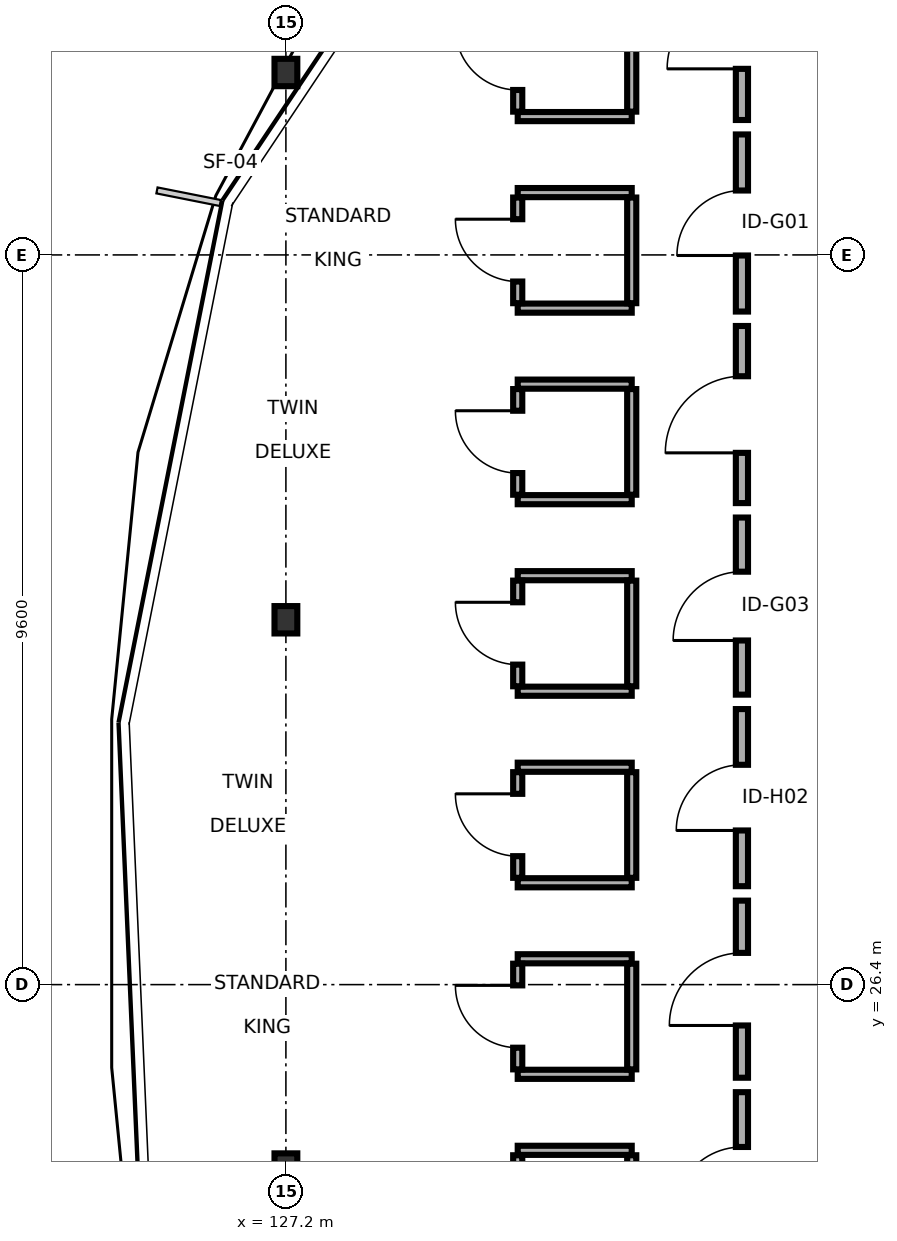
"""IFC4 building model, lengths in metres.
Left out: names, types, materials, properties, quantities, classifications, styles, units other than length and angle.
Written with IfcOpenShell. Run it as: python <this file> out.ifc"""

import sys

from ifc_helpers import new_model, si_unit, direction, frame, frame_2d, origin, origin_2d, place, context, subcontext, project, spatial, rectangle, i_section, extrude, element, fill, save


model = new_model("IFC4")
c1 = context("Model", 3, precision=1e-05, world=origin(), true_north=direction((0.0, 1.0)))
c2 = subcontext(c1, "Body", "Model", "MODEL_VIEW")
j1 = project(units=[si_unit("LENGTHUNIT", "METRE"), si_unit("PLANEANGLEUNIT", "RADIAN")], contexts=[c1])
p1 = place(None, origin())
s1 = spatial("IfcSite", under=j1, at=p1, CompositionType="ELEMENT")
p2 = place(p1, origin())
s2 = spatial("IfcBuilding", under=s1, at=p2, CompositionType="ELEMENT")
p3 = place(p2, frame((0.0, 0.0, 35.1)))
s3 = spatial("IfcBuildingStorey", under=s2, at=p3, CompositionType="ELEMENT", Elevation=35.1)
for number, where, z_axis, x_axis in (
    (1, (127.2, 38.4, 0.0), (0.0, 0.0, 1.0), (1.0, 0.0, 0.0)),
    (2, (127.2, 31.2, 0.0), (0.0, 0.0, 1.0), (1.0, 0.0, 0.0)),
    (3, (127.2, 24.0, 0.0), (0.0, 0.0, 1.0), (1.0, 0.0, 0.0)),
):
    element("IfcColumn", number, at=place(p3, frame(where, z_axis=z_axis, x_axis=x_axis)), inside=s3, PredefinedType="COLUMN", context=c2, shape_type="SweptSolid", body=[
        extrude(i_section(OverallWidth=0.3, OverallDepth=0.36, WebThickness=0.012, FlangeThickness=0.022, FilletRadius=0.027, at=origin_2d()), origin(), (0.0, 0.0, 1.0), 3.4),
    ])
p4 = place(p3, frame((133.2, 37.775, 0.0), z_axis=(0.0, 0.0, 1.0), x_axis=(0.0, 1.0, 0.0)))
e4 = element("IfcWall", 4, at=p4, inside=s3, PredefinedType="PARTITIONING", context=c2, shape_type="SweptSolid", body=[
    extrude(rectangle(XDim=2.33, YDim=0.16, at=frame_2d((1.165, 0.0))), origin(), (0.0, 0.0, 1.0), 2.75),
])
p5 = place(p4, frame((0.673, 0.0, 0.0)))
e5 = element("IfcOpeningElement", 5, at=p5, cuts=e4, PredefinedType="OPENING", context=c2, shape_type="SweptSolid", body=[
    extrude(rectangle(XDim=0.984, YDim=2.07, at=frame_2d((0.492, 1.035))), frame((0.0, 0.09, 0.0), z_axis=(0.0, -1.0, 0.0), x_axis=(1.0, 0.0, 0.0)), (0.0, 0.0, 1.0), 0.18),
])
p6 = place(p3, frame((130.25, 37.82, 0.0), z_axis=(0.0, 0.0, 1.0), x_axis=(1.0, 0.0, 0.0)))
e6 = element("IfcWall", 6, at=p6, inside=s3, PredefinedType="PARTITIONING", context=c2, shape_type="SweptSolid", body=[
    extrude(rectangle(XDim=1.5, YDim=0.12, at=frame_2d((0.75, 0.0))), origin(), (0.0, 0.0, 1.0), 3.165),
])
p7 = place(p3, frame((130.25, 37.885, 0.0), z_axis=(0.0, 0.0, 1.0), x_axis=(0.0, 1.0, 0.0)))
e7 = element("IfcWall", 7, at=p7, inside=s3, PredefinedType="PARTITIONING", context=c2, shape_type="SweptSolid", body=[
    extrude(rectangle(XDim=1.39, YDim=0.12, at=frame_2d((0.695, 0.0))), origin(), (0.0, 0.0, 1.0), 2.75),
])
p8 = place(p7, frame((0.285, 0.0, 0.0)))
e8 = element("IfcOpeningElement", 8, at=p8, cuts=e7, PredefinedType="OPENING", context=c2, shape_type="SweptSolid", body=[
    extrude(rectangle(XDim=0.82, YDim=2.08, at=frame_2d((0.41, 1.04))), frame((0.0, 0.07, 0.0), z_axis=(0.0, -1.0, 0.0), x_axis=(1.0, 0.0, 0.0)), (0.0, 0.0, 1.0), 0.14),
])
p9 = place(p3, frame((131.75, 37.885, 0.0), z_axis=(0.0, 0.0, 1.0), x_axis=(0.0, 1.0, 0.0)))
e9 = element("IfcWall", 9, at=p9, inside=s3, PredefinedType="PARTITIONING", context=c2, shape_type="SweptSolid", body=[
    extrude(rectangle(XDim=1.39, YDim=0.12, at=frame_2d((0.695, 0.0))), origin(), (0.0, 0.0, 1.0), 2.75),
])
p10 = place(p3, frame((133.2, 35.255, 0.0), z_axis=(0.0, 0.0, 1.0), x_axis=(0.0, 1.0, 0.0)))
e10 = element("IfcWall", 10, at=p10, inside=s3, PredefinedType="PARTITIONING", context=c2, shape_type="SweptSolid", body=[
    extrude(rectangle(XDim=2.33, YDim=0.16, at=frame_2d((1.165, 0.0))), origin(), (0.0, 0.0, 1.0), 3.165),
])
p11 = place(p10, frame((0.738, 0.0, 0.0)))
e11 = element("IfcOpeningElement", 11, at=p11, cuts=e10, PredefinedType="OPENING", context=c2, shape_type="SweptSolid", body=[
    extrude(rectangle(XDim=0.855, YDim=2.05, at=frame_2d((0.427, 1.025))), frame((0.0, 0.09, 0.0), z_axis=(0.0, -1.0, 0.0), x_axis=(1.0, 0.0, 0.0)), (0.0, 0.0, 1.0), 0.18),
])
for number, where, z_axis, x_axis in (
    (12, (130.25, 35.3, 0.0), (0.0, 0.0, 1.0), (1.0, 0.0, 0.0)),
    (13, (130.25, 36.82, 0.0), (0.0, 0.0, 1.0), (1.0, 0.0, 0.0)),
):
    element("IfcWall", number, at=place(p3, frame(where, z_axis=z_axis, x_axis=x_axis)), inside=s3, PredefinedType="PARTITIONING", context=c2, shape_type="SweptSolid", body=[
        extrude(rectangle(XDim=1.5, YDim=0.12, at=frame_2d((0.75, 0.0))), origin(), (0.0, 0.0, 1.0), 3.165),
    ])
p12 = place(p3, frame((130.25, 35.365, 0.0), z_axis=(0.0, 0.0, 1.0), x_axis=(0.0, 1.0, 0.0)))
e14 = element("IfcWall", 14, at=p12, inside=s3, PredefinedType="PARTITIONING", context=c2, shape_type="SweptSolid", body=[
    extrude(rectangle(XDim=1.39, YDim=0.12, at=frame_2d((0.695, 0.0))), origin(), (0.0, 0.0, 1.0), 3.165),
])
p13 = place(p12, frame((0.285, 0.0, 0.0)))
e15 = element("IfcOpeningElement", 15, at=p13, cuts=e14, PredefinedType="OPENING", context=c2, shape_type="SweptSolid", body=[
    extrude(rectangle(XDim=0.82, YDim=2.08, at=frame_2d((0.41, 1.04))), frame((0.0, 0.07, 0.0), z_axis=(0.0, -1.0, 0.0), x_axis=(1.0, 0.0, 0.0)), (0.0, 0.0, 1.0), 0.14),
])
p14 = place(p3, frame((131.75, 35.365, 0.0), z_axis=(0.0, 0.0, 1.0), x_axis=(0.0, 1.0, 0.0)))
e16 = element("IfcWall", 16, at=p14, inside=s3, PredefinedType="PARTITIONING", context=c2, shape_type="SweptSolid", body=[
    extrude(rectangle(XDim=1.39, YDim=0.12, at=frame_2d((0.695, 0.0))), origin(), (0.0, 0.0, 1.0), 3.165),
])
p15 = place(p3, frame((133.2, 32.735, 0.0), z_axis=(0.0, 0.0, 1.0), x_axis=(0.0, 1.0, 0.0)))
e17 = element("IfcWall", 17, at=p15, inside=s3, PredefinedType="PARTITIONING", context=c2, shape_type="SweptSolid", body=[
    extrude(rectangle(XDim=2.33, YDim=0.16, at=frame_2d((1.165, 0.0))), origin(), (0.0, 0.0, 1.0), 3.165),
])
p16 = place(p15, frame((0.661, 0.0, 0.0)))
e18 = element("IfcOpeningElement", 18, at=p16, cuts=e17, PredefinedType="OPENING", context=c2, shape_type="SweptSolid", body=[
    extrude(rectangle(XDim=1.008, YDim=2.13, at=frame_2d((0.504, 1.065))), frame((0.0, 0.09, 0.0), z_axis=(0.0, -1.0, 0.0), x_axis=(1.0, 0.0, 0.0)), (0.0, 0.0, 1.0), 0.18),
])
for number, where, z_axis, x_axis in (
    (19, (130.25, 32.78, 0.0), (0.0, 0.0, 1.0), (1.0, 0.0, 0.0)),
    (20, (130.25, 34.3, 0.0), (0.0, 0.0, 1.0), (1.0, 0.0, 0.0)),
):
    element("IfcWall", number, at=place(p3, frame(where, z_axis=z_axis, x_axis=x_axis)), inside=s3, PredefinedType="PARTITIONING", context=c2, shape_type="SweptSolid", body=[
        extrude(rectangle(XDim=1.5, YDim=0.12, at=frame_2d((0.75, 0.0))), origin(), (0.0, 0.0, 1.0), 3.165),
    ])
p17 = place(p3, frame((130.25, 32.845, 0.0), z_axis=(0.0, 0.0, 1.0), x_axis=(0.0, 1.0, 0.0)))
e21 = element("IfcWall", 21, at=p17, inside=s3, PredefinedType="PARTITIONING", context=c2, shape_type="SweptSolid", body=[
    extrude(rectangle(XDim=1.39, YDim=0.12, at=frame_2d((0.695, 0.0))), origin(), (0.0, 0.0, 1.0), 3.165),
])
p18 = place(p17, frame((0.285, 0.0, 0.0)))
e22 = element("IfcOpeningElement", 22, at=p18, cuts=e21, PredefinedType="OPENING", context=c2, shape_type="SweptSolid", body=[
    extrude(rectangle(XDim=0.82, YDim=2.08, at=frame_2d((0.41, 1.04))), frame((0.0, 0.07, 0.0), z_axis=(0.0, -1.0, 0.0), x_axis=(1.0, 0.0, 0.0)), (0.0, 0.0, 1.0), 0.14),
])
p19 = place(p3, frame((131.75, 32.845, 0.0), z_axis=(0.0, 0.0, 1.0), x_axis=(0.0, 1.0, 0.0)))
e23 = element("IfcWall", 23, at=p19, inside=s3, PredefinedType="PARTITIONING", context=c2, shape_type="SweptSolid", body=[
    extrude(rectangle(XDim=1.39, YDim=0.12, at=frame_2d((0.695, 0.0))), origin(), (0.0, 0.0, 1.0), 3.165),
])
p20 = place(p3, frame((133.2, 30.215, 0.0), z_axis=(0.0, 0.0, 1.0), x_axis=(0.0, 1.0, 0.0)))
e24 = element("IfcWall", 24, at=p20, inside=s3, PredefinedType="PARTITIONING", context=c2, shape_type="SweptSolid", body=[
    extrude(rectangle(XDim=2.33, YDim=0.16, at=frame_2d((1.165, 0.0))), origin(), (0.0, 0.0, 1.0), 2.75),
])
p21 = place(p20, frame((0.712, 0.0, 0.0)))
e25 = element("IfcOpeningElement", 25, at=p21, cuts=e24, PredefinedType="OPENING", context=c2, shape_type="SweptSolid", body=[
    extrude(rectangle(XDim=0.905, YDim=2.05, at=frame_2d((0.453, 1.025))), frame((0.0, 0.09, 0.0), z_axis=(0.0, -1.0, 0.0), x_axis=(1.0, 0.0, 0.0)), (0.0, 0.0, 1.0), 0.18),
])
for number, where, z_axis, x_axis in (
    (26, (130.25, 30.26, 0.0), (0.0, 0.0, 1.0), (1.0, 0.0, 0.0)),
    (27, (130.25, 31.78, 0.0), (0.0, 0.0, 1.0), (1.0, 0.0, 0.0)),
):
    element("IfcWall", number, at=place(p3, frame(where, z_axis=z_axis, x_axis=x_axis)), inside=s3, PredefinedType="PARTITIONING", context=c2, shape_type="SweptSolid", body=[
        extrude(rectangle(XDim=1.5, YDim=0.12, at=frame_2d((0.75, 0.0))), origin(), (0.0, 0.0, 1.0), 3.165),
    ])
p22 = place(p3, frame((130.25, 30.325, 0.0), z_axis=(0.0, 0.0, 1.0), x_axis=(0.0, 1.0, 0.0)))
e28 = element("IfcWall", 28, at=p22, inside=s3, PredefinedType="PARTITIONING", context=c2, shape_type="SweptSolid", body=[
    extrude(rectangle(XDim=1.39, YDim=0.12, at=frame_2d((0.695, 0.0))), origin(), (0.0, 0.0, 1.0), 2.75),
])
p23 = place(p22, frame((0.285, 0.0, 0.0)))
e29 = element("IfcOpeningElement", 29, at=p23, cuts=e28, PredefinedType="OPENING", context=c2, shape_type="SweptSolid", body=[
    extrude(rectangle(XDim=0.82, YDim=2.08, at=frame_2d((0.41, 1.04))), frame((0.0, 0.07, 0.0), z_axis=(0.0, -1.0, 0.0), x_axis=(1.0, 0.0, 0.0)), (0.0, 0.0, 1.0), 0.14),
])
p24 = place(p3, frame((131.75, 30.325, 0.0), z_axis=(0.0, 0.0, 1.0), x_axis=(0.0, 1.0, 0.0)))
e30 = element("IfcWall", 30, at=p24, inside=s3, PredefinedType="PARTITIONING", context=c2, shape_type="SweptSolid", body=[
    extrude(rectangle(XDim=1.39, YDim=0.12, at=frame_2d((0.695, 0.0))), origin(), (0.0, 0.0, 1.0), 2.75),
])
p25 = place(p3, frame((133.2, 27.695, 0.0), z_axis=(0.0, 0.0, 1.0), x_axis=(0.0, 1.0, 0.0)))
e31 = element("IfcWall", 31, at=p25, inside=s3, PredefinedType="PARTITIONING", context=c2, shape_type="SweptSolid", body=[
    extrude(rectangle(XDim=2.33, YDim=0.16, at=frame_2d((1.165, 0.0))), origin(), (0.0, 0.0, 1.0), 3.165),
])
p26 = place(p25, frame((0.733, 0.0, 0.0)))
e32 = element("IfcOpeningElement", 32, at=p26, cuts=e31, PredefinedType="OPENING", context=c2, shape_type="SweptSolid", body=[
    extrude(rectangle(XDim=0.864, YDim=2.13, at=frame_2d((0.432, 1.065))), frame((0.0, 0.09, 0.0), z_axis=(0.0, -1.0, 0.0), x_axis=(1.0, 0.0, 0.0)), (0.0, 0.0, 1.0), 0.18),
])
for number, where, z_axis, x_axis in (
    (33, (130.25, 27.74, 0.0), (0.0, 0.0, 1.0), (1.0, 0.0, 0.0)),
    (34, (130.25, 29.26, 0.0), (0.0, 0.0, 1.0), (1.0, 0.0, 0.0)),
):
    element("IfcWall", number, at=place(p3, frame(where, z_axis=z_axis, x_axis=x_axis)), inside=s3, PredefinedType="PARTITIONING", context=c2, shape_type="SweptSolid", body=[
        extrude(rectangle(XDim=1.5, YDim=0.12, at=frame_2d((0.75, 0.0))), origin(), (0.0, 0.0, 1.0), 3.165),
    ])
p27 = place(p3, frame((130.25, 27.805, 0.0), z_axis=(0.0, 0.0, 1.0), x_axis=(0.0, 1.0, 0.0)))
e35 = element("IfcWall", 35, at=p27, inside=s3, PredefinedType="PARTITIONING", context=c2, shape_type="SweptSolid", body=[
    extrude(rectangle(XDim=1.39, YDim=0.12, at=frame_2d((0.695, 0.0))), origin(), (0.0, 0.0, 1.0), 3.165),
])
p28 = place(p27, frame((0.285, 0.0, 0.0)))
e36 = element("IfcOpeningElement", 36, at=p28, cuts=e35, PredefinedType="OPENING", context=c2, shape_type="SweptSolid", body=[
    extrude(rectangle(XDim=0.82, YDim=2.08, at=frame_2d((0.41, 1.04))), frame((0.0, 0.07, 0.0), z_axis=(0.0, -1.0, 0.0), x_axis=(1.0, 0.0, 0.0)), (0.0, 0.0, 1.0), 0.14),
])
p29 = place(p3, frame((131.75, 27.805, 0.0), z_axis=(0.0, 0.0, 1.0), x_axis=(0.0, 1.0, 0.0)))
e37 = element("IfcWall", 37, at=p29, inside=s3, PredefinedType="PARTITIONING", context=c2, shape_type="SweptSolid", body=[
    extrude(rectangle(XDim=1.39, YDim=0.12, at=frame_2d((0.695, 0.0))), origin(), (0.0, 0.0, 1.0), 3.165),
])
p30 = place(p3, frame((133.2, 25.175, 0.0), z_axis=(0.0, 0.0, 1.0), x_axis=(0.0, 1.0, 0.0)))
e38 = element("IfcWall", 38, at=p30, inside=s3, PredefinedType="PARTITIONING", context=c2, shape_type="SweptSolid", body=[
    extrude(rectangle(XDim=2.33, YDim=0.16, at=frame_2d((1.165, 0.0))), origin(), (0.0, 0.0, 1.0), 3.165),
])
p31 = place(p30, frame((0.688, 0.0, 0.0)))
e39 = element("IfcOpeningElement", 39, at=p31, cuts=e38, PredefinedType="OPENING", context=c2, shape_type="SweptSolid", body=[
    extrude(rectangle(XDim=0.955, YDim=2.05, at=frame_2d((0.478, 1.025))), frame((0.0, 0.09, 0.0), z_axis=(0.0, -1.0, 0.0), x_axis=(1.0, 0.0, 0.0)), (0.0, 0.0, 1.0), 0.18),
])
for number, where, z_axis, x_axis in (
    (40, (130.25, 25.22, 0.0), (0.0, 0.0, 1.0), (1.0, 0.0, 0.0)),
    (41, (130.25, 26.74, 0.0), (0.0, 0.0, 1.0), (1.0, 0.0, 0.0)),
):
    element("IfcWall", number, at=place(p3, frame(where, z_axis=z_axis, x_axis=x_axis)), inside=s3, PredefinedType="PARTITIONING", context=c2, shape_type="SweptSolid", body=[
        extrude(rectangle(XDim=1.5, YDim=0.12, at=frame_2d((0.75, 0.0))), origin(), (0.0, 0.0, 1.0), 3.165),
    ])
p32 = place(p3, frame((130.25, 25.285, 0.0), z_axis=(0.0, 0.0, 1.0), x_axis=(0.0, 1.0, 0.0)))
e42 = element("IfcWall", 42, at=p32, inside=s3, PredefinedType="PARTITIONING", context=c2, shape_type="SweptSolid", body=[
    extrude(rectangle(XDim=1.39, YDim=0.12, at=frame_2d((0.695, 0.0))), origin(), (0.0, 0.0, 1.0), 3.165),
])
p33 = place(p32, frame((0.285, 0.0, 0.0)))
e43 = element("IfcOpeningElement", 43, at=p33, cuts=e42, PredefinedType="OPENING", context=c2, shape_type="SweptSolid", body=[
    extrude(rectangle(XDim=0.82, YDim=2.08, at=frame_2d((0.41, 1.04))), frame((0.0, 0.07, 0.0), z_axis=(0.0, -1.0, 0.0), x_axis=(1.0, 0.0, 0.0)), (0.0, 0.0, 1.0), 0.14),
])
p34 = place(p3, frame((131.75, 25.285, 0.0), z_axis=(0.0, 0.0, 1.0), x_axis=(0.0, 1.0, 0.0)))
e44 = element("IfcWall", 44, at=p34, inside=s3, PredefinedType="PARTITIONING", context=c2, shape_type="SweptSolid", body=[
    extrude(rectangle(XDim=1.39, YDim=0.12, at=frame_2d((0.695, 0.0))), origin(), (0.0, 0.0, 1.0), 3.165),
])
p35 = place(p3, frame((133.2, 22.655, 0.0), z_axis=(0.0, 0.0, 1.0), x_axis=(0.0, 1.0, 0.0)))
e45 = element("IfcWall", 45, at=p35, inside=s3, PredefinedType="PARTITIONING", context=c2, shape_type="SweptSolid", body=[
    extrude(rectangle(XDim=2.33, YDim=0.16, at=frame_2d((1.165, 0.0))), origin(), (0.0, 0.0, 1.0), 2.75),
])
p36 = place(p35, frame((0.721, 0.0, 0.0)))
e46 = element("IfcOpeningElement", 46, at=p36, cuts=e45, PredefinedType="OPENING", context=c2, shape_type="SweptSolid", body=[
    extrude(rectangle(XDim=0.888, YDim=2.07, at=frame_2d((0.444, 1.035))), frame((0.0, 0.09, 0.0), z_axis=(0.0, -1.0, 0.0), x_axis=(1.0, 0.0, 0.0)), (0.0, 0.0, 1.0), 0.18),
])
p37 = place(p3, frame((130.25, 24.22, 0.0), z_axis=(0.0, 0.0, 1.0), x_axis=(1.0, 0.0, 0.0)))
e47 = element("IfcWall", 47, at=p37, inside=s3, PredefinedType="PARTITIONING", context=c2, shape_type="SweptSolid", body=[
    extrude(rectangle(XDim=1.5, YDim=0.12, at=frame_2d((0.75, 0.0))), origin(), (0.0, 0.0, 1.0), 2.75),
])
p38 = place(p3, frame((130.25, 22.765, 0.0), z_axis=(0.0, 0.0, 1.0), x_axis=(0.0, 1.0, 0.0)))
e48 = element("IfcWall", 48, at=p38, inside=s3, PredefinedType="PARTITIONING", context=c2, shape_type="SweptSolid", body=[
    extrude(rectangle(XDim=1.39, YDim=0.12, at=frame_2d((0.695, 0.0))), origin(), (0.0, 0.0, 1.0), 2.75),
])
p39 = place(p38, frame((0.285, 0.0, 0.0)))
e49 = element("IfcOpeningElement", 49, at=p39, cuts=e48, PredefinedType="OPENING", context=c2, shape_type="SweptSolid", body=[
    extrude(rectangle(XDim=0.82, YDim=2.08, at=frame_2d((0.41, 1.04))), frame((0.0, 0.07, 0.0), z_axis=(0.0, -1.0, 0.0), x_axis=(1.0, 0.0, 0.0)), (0.0, 0.0, 1.0), 0.14),
])
p40 = place(p3, frame((131.75, 22.765, 0.0), z_axis=(0.0, 0.0, 1.0), x_axis=(0.0, 1.0, 0.0)))
e50 = element("IfcWall", 50, at=p40, inside=s3, PredefinedType="PARTITIONING", context=c2, shape_type="SweptSolid", body=[
    extrude(rectangle(XDim=1.39, YDim=0.12, at=frame_2d((0.695, 0.0))), origin(), (0.0, 0.0, 1.0), 2.75),
])
p41 = place(p5, origin())
e51 = element("IfcDoor", 51, at=p41, inside=s3, OperationType="SINGLE_SWING_LEFT", PredefinedType="DOOR", context=c2, shape_type="SweptSolid", body=[
    extrude(rectangle(XDim=0.984, YDim=2.07, at=frame_2d((0.492, 1.035))), frame((0.0, 0.025, 0.0), z_axis=(0.0, -1.0, 0.0), x_axis=(1.0, 0.0, 0.0)), (0.0, 0.0, 1.0), 0.05),
])
fill(e5, e51)
p42 = place(p8, origin())
e52 = element("IfcDoor", 52, at=p42, inside=s3, OperationType="SINGLE_SWING_RIGHT", PredefinedType="DOOR", context=c2, shape_type="SweptSolid", body=[
    extrude(rectangle(XDim=0.82, YDim=2.08, at=frame_2d((0.41, 1.04))), frame((0.0, 0.025, 0.0), z_axis=(0.0, -1.0, 0.0), x_axis=(1.0, 0.0, 0.0)), (0.0, 0.0, 1.0), 0.05),
])
fill(e8, e52)
p43 = place(p11, origin())
e53 = element("IfcDoor", 53, at=p43, inside=s3, OperationType="SINGLE_SWING_LEFT", PredefinedType="DOOR", context=c2, shape_type="SweptSolid", body=[
    extrude(rectangle(XDim=0.855, YDim=2.05, at=frame_2d((0.427, 1.025))), frame((0.0, 0.025, 0.0), z_axis=(0.0, -1.0, 0.0), x_axis=(1.0, 0.0, 0.0)), (0.0, 0.0, 1.0), 0.05),
])
fill(e11, e53)
p44 = place(p13, origin())
e54 = element("IfcDoor", 54, at=p44, inside=s3, OperationType="SINGLE_SWING_RIGHT", PredefinedType="DOOR", context=c2, shape_type="SweptSolid", body=[
    extrude(rectangle(XDim=0.82, YDim=2.08, at=frame_2d((0.41, 1.04))), frame((0.0, 0.025, 0.0), z_axis=(0.0, -1.0, 0.0), x_axis=(1.0, 0.0, 0.0)), (0.0, 0.0, 1.0), 0.05),
])
fill(e15, e54)
p45 = place(p16, origin())
e55 = element("IfcDoor", 55, at=p45, inside=s3, OperationType="SINGLE_SWING_LEFT", PredefinedType="DOOR", context=c2, shape_type="SweptSolid", body=[
    extrude(rectangle(XDim=1.008, YDim=2.13, at=frame_2d((0.504, 1.065))), frame((0.0, 0.025, 0.0), z_axis=(0.0, -1.0, 0.0), x_axis=(1.0, 0.0, 0.0)), (0.0, 0.0, 1.0), 0.05),
])
fill(e18, e55)
p46 = place(p18, origin())
e56 = element("IfcDoor", 56, at=p46, inside=s3, OperationType="SINGLE_SWING_RIGHT", PredefinedType="DOOR", context=c2, shape_type="SweptSolid", body=[
    extrude(rectangle(XDim=0.82, YDim=2.08, at=frame_2d((0.41, 1.04))), frame((0.0, 0.025, 0.0), z_axis=(0.0, -1.0, 0.0), x_axis=(1.0, 0.0, 0.0)), (0.0, 0.0, 1.0), 0.05),
])
fill(e22, e56)
p47 = place(p21, origin())
e57 = element("IfcDoor", 57, at=p47, inside=s3, OperationType="SINGLE_SWING_LEFT", PredefinedType="DOOR", context=c2, shape_type="SweptSolid", body=[
    extrude(rectangle(XDim=0.905, YDim=2.05, at=frame_2d((0.453, 1.025))), frame((0.0, 0.025, 0.0), z_axis=(0.0, -1.0, 0.0), x_axis=(1.0, 0.0, 0.0)), (0.0, 0.0, 1.0), 0.05),
])
fill(e25, e57)
p48 = place(p23, origin())
e58 = element("IfcDoor", 58, at=p48, inside=s3, OperationType="SINGLE_SWING_RIGHT", PredefinedType="DOOR", context=c2, shape_type="SweptSolid", body=[
    extrude(rectangle(XDim=0.82, YDim=2.08, at=frame_2d((0.41, 1.04))), frame((0.0, 0.025, 0.0), z_axis=(0.0, -1.0, 0.0), x_axis=(1.0, 0.0, 0.0)), (0.0, 0.0, 1.0), 0.05),
])
fill(e29, e58)
p49 = place(p26, origin())
e59 = element("IfcDoor", 59, at=p49, inside=s3, OperationType="SINGLE_SWING_LEFT", PredefinedType="DOOR", context=c2, shape_type="SweptSolid", body=[
    extrude(rectangle(XDim=0.864, YDim=2.13, at=frame_2d((0.432, 1.065))), frame((0.0, 0.025, 0.0), z_axis=(0.0, -1.0, 0.0), x_axis=(1.0, 0.0, 0.0)), (0.0, 0.0, 1.0), 0.05),
])
fill(e32, e59)
p50 = place(p28, origin())
e60 = element("IfcDoor", 60, at=p50, inside=s3, OperationType="SINGLE_SWING_RIGHT", PredefinedType="DOOR", context=c2, shape_type="SweptSolid", body=[
    extrude(rectangle(XDim=0.82, YDim=2.08, at=frame_2d((0.41, 1.04))), frame((0.0, 0.025, 0.0), z_axis=(0.0, -1.0, 0.0), x_axis=(1.0, 0.0, 0.0)), (0.0, 0.0, 1.0), 0.05),
])
fill(e36, e60)
p51 = place(p31, origin())
e61 = element("IfcDoor", 61, at=p51, inside=s3, OperationType="SINGLE_SWING_LEFT", PredefinedType="DOOR", context=c2, shape_type="SweptSolid", body=[
    extrude(rectangle(XDim=0.955, YDim=2.05, at=frame_2d((0.478, 1.025))), frame((0.0, 0.025, 0.0), z_axis=(0.0, -1.0, 0.0), x_axis=(1.0, 0.0, 0.0)), (0.0, 0.0, 1.0), 0.05),
])
fill(e39, e61)
p52 = place(p33, origin())
e62 = element("IfcDoor", 62, at=p52, inside=s3, OperationType="SINGLE_SWING_RIGHT", PredefinedType="DOOR", context=c2, shape_type="SweptSolid", body=[
    extrude(rectangle(XDim=0.82, YDim=2.08, at=frame_2d((0.41, 1.04))), frame((0.0, 0.025, 0.0), z_axis=(0.0, -1.0, 0.0), x_axis=(1.0, 0.0, 0.0)), (0.0, 0.0, 1.0), 0.05),
])
fill(e43, e62)
p53 = place(p36, origin())
e63 = element("IfcDoor", 63, at=p53, inside=s3, OperationType="SINGLE_SWING_LEFT", PredefinedType="DOOR", context=c2, shape_type="SweptSolid", body=[
    extrude(rectangle(XDim=0.888, YDim=2.07, at=frame_2d((0.444, 1.035))), frame((0.0, 0.025, 0.0), z_axis=(0.0, -1.0, 0.0), x_axis=(1.0, 0.0, 0.0)), (0.0, 0.0, 1.0), 0.05),
])
fill(e46, e63)
save(model, sys.argv[1])
